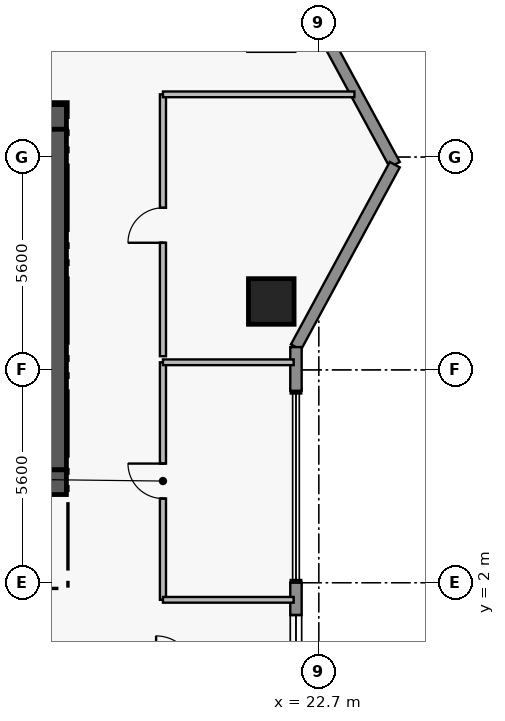
"""IFC4 building model, lengths in metres.
Left out: names, types, materials, properties, quantities, classifications, styles, units other than length and angle.
Written with IfcOpenShell. Run it as: python <this file> out.ifc"""

import sys

from ifc_helpers import new_model, si_unit, direction, frame, frame_2d, origin, origin_2d, place, context, subcontext, project, spatial, rectangle, extrude, element, fill, save


model = new_model("IFC4")
c1 = context("Model", 3, precision=1e-05, world=origin(), true_north=direction((0.0, 1.0)))
c2 = subcontext(c1, "Body", "Model", "MODEL_VIEW")
j1 = project(units=[si_unit("LENGTHUNIT", "METRE"), si_unit("PLANEANGLEUNIT", "RADIAN")], contexts=[c1])
p1 = place(None, origin())
s1 = spatial("IfcSite", under=j1, at=p1, CompositionType="ELEMENT")
p2 = place(p1, origin())
s2 = spatial("IfcBuilding", under=s1, at=p2, CompositionType="ELEMENT")
p3 = place(p2, frame((0.0, 0.0, 181.15)))
s3 = spatial("IfcBuildingStorey", under=s2, at=p3, CompositionType="ELEMENT", Elevation=181.15)
p4 = place(p3, frame((11.6, 14.255, 0.0), z_axis=(0.0, 0.0, 1.0), x_axis=(1.0, 0.0, 0.0)))
e1 = element("IfcWall", 1, at=p4, inside=s3, PredefinedType="SHEAR", context=c2, shape_type="SweptSolid", body=[
    extrude(rectangle(XDim=4.46, YDim=0.65, at=frame_2d((2.23, 0.0))), origin(), (0.0, 0.0, 1.0), 3.56),
])
p5 = place(p3, frame((15.735, 4.97, 0.0), z_axis=(0.0, 0.0, 1.0), x_axis=(0.0, 1.0, 0.0)))
e2 = element("IfcWall", 2, at=p5, inside=s3, PredefinedType="SHEAR", context=c2, shape_type="SweptSolid", body=[
    extrude(rectangle(XDim=8.96, YDim=0.65, at=frame_2d((4.48, 0.0))), origin(), (0.0, 0.0, 1.0), 3.56),
])
p6 = place(p3, frame((11.6, 4.645, 0.0), z_axis=(0.0, 0.0, 1.0), x_axis=(1.0, 0.0, 0.0)))
e3 = element("IfcWall", 3, at=p6, inside=s3, PredefinedType="SHEAR", context=c2, shape_type="SweptSolid", body=[
    extrude(rectangle(XDim=4.46, YDim=0.65, at=frame_2d((2.23, 0.0))), origin(), (0.0, 0.0, 1.0), 3.56),
])
p7 = place(p3, frame((21.45, 9.4, 0.0), z_axis=(0.0, 0.0, 1.0), x_axis=(1.0, 0.0, 0.0)))
e4 = element("IfcColumn", 4, at=p7, inside=s3, PredefinedType="COLUMN", context=c2, shape_type="SweptSolid", body=[
    extrude(rectangle(XDim=1.2, YDim=1.2, at=origin_2d()), origin(), (0.0, 0.0, 1.0), 3.75),
])
for number, where, z_axis, x_axis in (
    (5, (22.1, 17.8, 0.0), (0.0, 0.0, 1.0), (0.476, -0.879, 0.0)),
    (6, (24.7, 13.0, 0.0), (0.0, 0.0, 1.0), (-0.476, -0.879, 0.0)),
):
    element("IfcWall", number, at=place(p3, frame(where, z_axis=z_axis, x_axis=x_axis)), inside=s3, PredefinedType="STANDARD", context=c2, shape_type="SweptSolid", body=[
        extrude(rectangle(XDim=5.459, YDim=0.3, at=frame_2d((2.729, 0.0))), origin(), (0.0, 0.0, 1.0), 3.53),
    ])
p8 = place(p3, frame((22.1, 8.2, 0.0), z_axis=(0.0, 0.0, 1.0), x_axis=(0.0, -1.0, 0.0)))
e7 = element("IfcWall", 7, at=p8, inside=s3, PredefinedType="STANDARD", context=c2, shape_type="SweptSolid", body=[
    extrude(rectangle(XDim=1.15, YDim=0.3, at=frame_2d((0.575, 0.0))), origin(), (0.0, 0.0, 1.0), 3.53),
])
p9 = place(p3, frame((22.1, 2.0, 0.0), z_axis=(0.0, 0.0, 1.0), x_axis=(0.0, -1.0, 0.0)))
e8 = element("IfcWall", 8, at=p9, inside=s3, PredefinedType="STANDARD", context=c2, shape_type="SweptSolid", body=[
    extrude(rectangle(XDim=2.85, YDim=0.3, at=frame_2d((1.425, 0.0))), origin(), (0.0, 0.0, 1.0), 3.53),
])
p10 = place(p9, frame((0.85, 0.0, 0.95)))
e9 = element("IfcOpeningElement", 9, at=p10, cuts=e8, PredefinedType="OPENING", context=c2, shape_type="SweptSolid", body=[
    extrude(rectangle(XDim=1.15, YDim=1.55, at=frame_2d((0.575, 0.775))), frame((0.0, 0.16, 0.0), z_axis=(0.0, -1.0, 0.0), x_axis=(1.0, 0.0, 0.0)), (0.0, 0.0, 1.0), 0.32),
])
p11 = place(p3, frame((18.6, 1.55, 0.0), z_axis=(0.0, 0.0, 1.0), x_axis=(0.0, 1.0, 0.0)))
e10 = element("IfcWall", 10, at=p11, inside=s3, PredefinedType="PARTITIONING", context=c2, shape_type="SweptSolid", body=[
    extrude(rectangle(XDim=6.25, YDim=0.16, at=frame_2d((3.125, 0.0))), origin(), (0.0, 0.0, 1.0), 3.53),
])
p12 = place(p11, frame((2.665, 0.0, 0.0)))
e11 = element("IfcOpeningElement", 11, at=p12, cuts=e10, PredefinedType="OPENING", context=c2, shape_type="SweptSolid", body=[
    extrude(rectangle(XDim=0.92, YDim=2.12, at=frame_2d((0.46, 1.06))), frame((0.0, 0.09, 0.0), z_axis=(0.0, -1.0, 0.0), x_axis=(1.0, 0.0, 0.0)), (0.0, 0.0, 1.0), 0.18),
])
p13 = place(p3, frame((18.6, 7.96, 0.0), z_axis=(0.0, 0.0, 1.0), x_axis=(0.0, 1.0, 0.0)))
e12 = element("IfcWall", 12, at=p13, inside=s3, PredefinedType="PARTITIONING", context=c2, shape_type="SweptSolid", body=[
    extrude(rectangle(XDim=6.89, YDim=0.16, at=frame_2d((3.445, 0.0))), origin(), (0.0, 0.0, 1.0), 3.53),
])
p14 = place(p13, frame((2.985, 0.0, 0.0)))
e13 = element("IfcOpeningElement", 13, at=p14, cuts=e12, PredefinedType="OPENING", context=c2, shape_type="SweptSolid", body=[
    extrude(rectangle(XDim=0.92, YDim=2.12, at=frame_2d((0.46, 1.06))), frame((0.0, 0.09, 0.0), z_axis=(0.0, -1.0, 0.0), x_axis=(1.0, 0.0, 0.0)), (0.0, 0.0, 1.0), 0.18),
])
for number, where, z_axis, x_axis in (
    (14, (18.6, 1.55, 0.0), (0.0, 0.0, 1.0), (1.0, 0.0, 0.0)),
    (15, (18.6, 7.8, 0.0), (0.0, 0.0, 1.0), (1.0, 0.0, 0.0)),
):
    element("IfcWall", number, at=place(p3, frame(where, z_axis=z_axis, x_axis=x_axis)), inside=s3, PredefinedType="PARTITIONING", context=c2, shape_type="SweptSolid", body=[
        extrude(rectangle(XDim=3.44, YDim=0.15, at=frame_2d((1.72, 0.0))), origin(), (0.0, 0.0, 1.0), 3.53),
    ])
p15 = place(p3, frame((18.6, 14.85, 0.0), z_axis=(0.0, 0.0, 1.0), x_axis=(1.0, 0.0, 0.0)))
e16 = element("IfcWall", 16, at=p15, inside=s3, PredefinedType="PARTITIONING", context=c2, shape_type="SweptSolid", body=[
    extrude(rectangle(XDim=5.038, YDim=0.15, at=frame_2d((2.519, 0.0))), origin(), (0.0, 0.0, 1.0), 3.53),
])
p16 = place(p10, origin())
e17 = element("IfcWindow", 17, at=p16, inside=s3, PartitioningType="SINGLE_PANEL", PredefinedType="WINDOW", context=c2, shape_type="SweptSolid", body=[
    extrude(rectangle(XDim=1.15, YDim=1.55, at=frame_2d((0.575, 0.775))), frame((0.0, 0.03, 0.0), z_axis=(0.0, -1.0, 0.0), x_axis=(1.0, 0.0, 0.0)), (0.0, 0.0, 1.0), 0.06),
])
fill(e9, e17)
p17 = place(p12, origin())
e18 = element("IfcDoor", 18, at=p17, inside=s3, OperationType="SINGLE_SWING_RIGHT", PredefinedType="DOOR", context=c2, shape_type="SweptSolid", body=[
    extrude(rectangle(XDim=0.92, YDim=2.12, at=frame_2d((0.46, 1.06))), frame((0.0, 0.025, 0.0), z_axis=(0.0, -1.0, 0.0), x_axis=(1.0, 0.0, 0.0)), (0.0, 0.0, 1.0), 0.05),
])
fill(e11, e18)
p18 = place(p14, origin())
e19 = element("IfcDoor", 19, at=p18, inside=s3, OperationType="SINGLE_SWING_LEFT", PredefinedType="DOOR", context=c2, shape_type="SweptSolid", body=[
    extrude(rectangle(XDim=0.92, YDim=2.12, at=frame_2d((0.46, 1.06))), frame((0.0, 0.025, 0.0), z_axis=(0.0, -1.0, 0.0), x_axis=(1.0, 0.0, 0.0)), (0.0, 0.0, 1.0), 0.05),
])
fill(e13, e19)
save(model, sys.argv[1])
